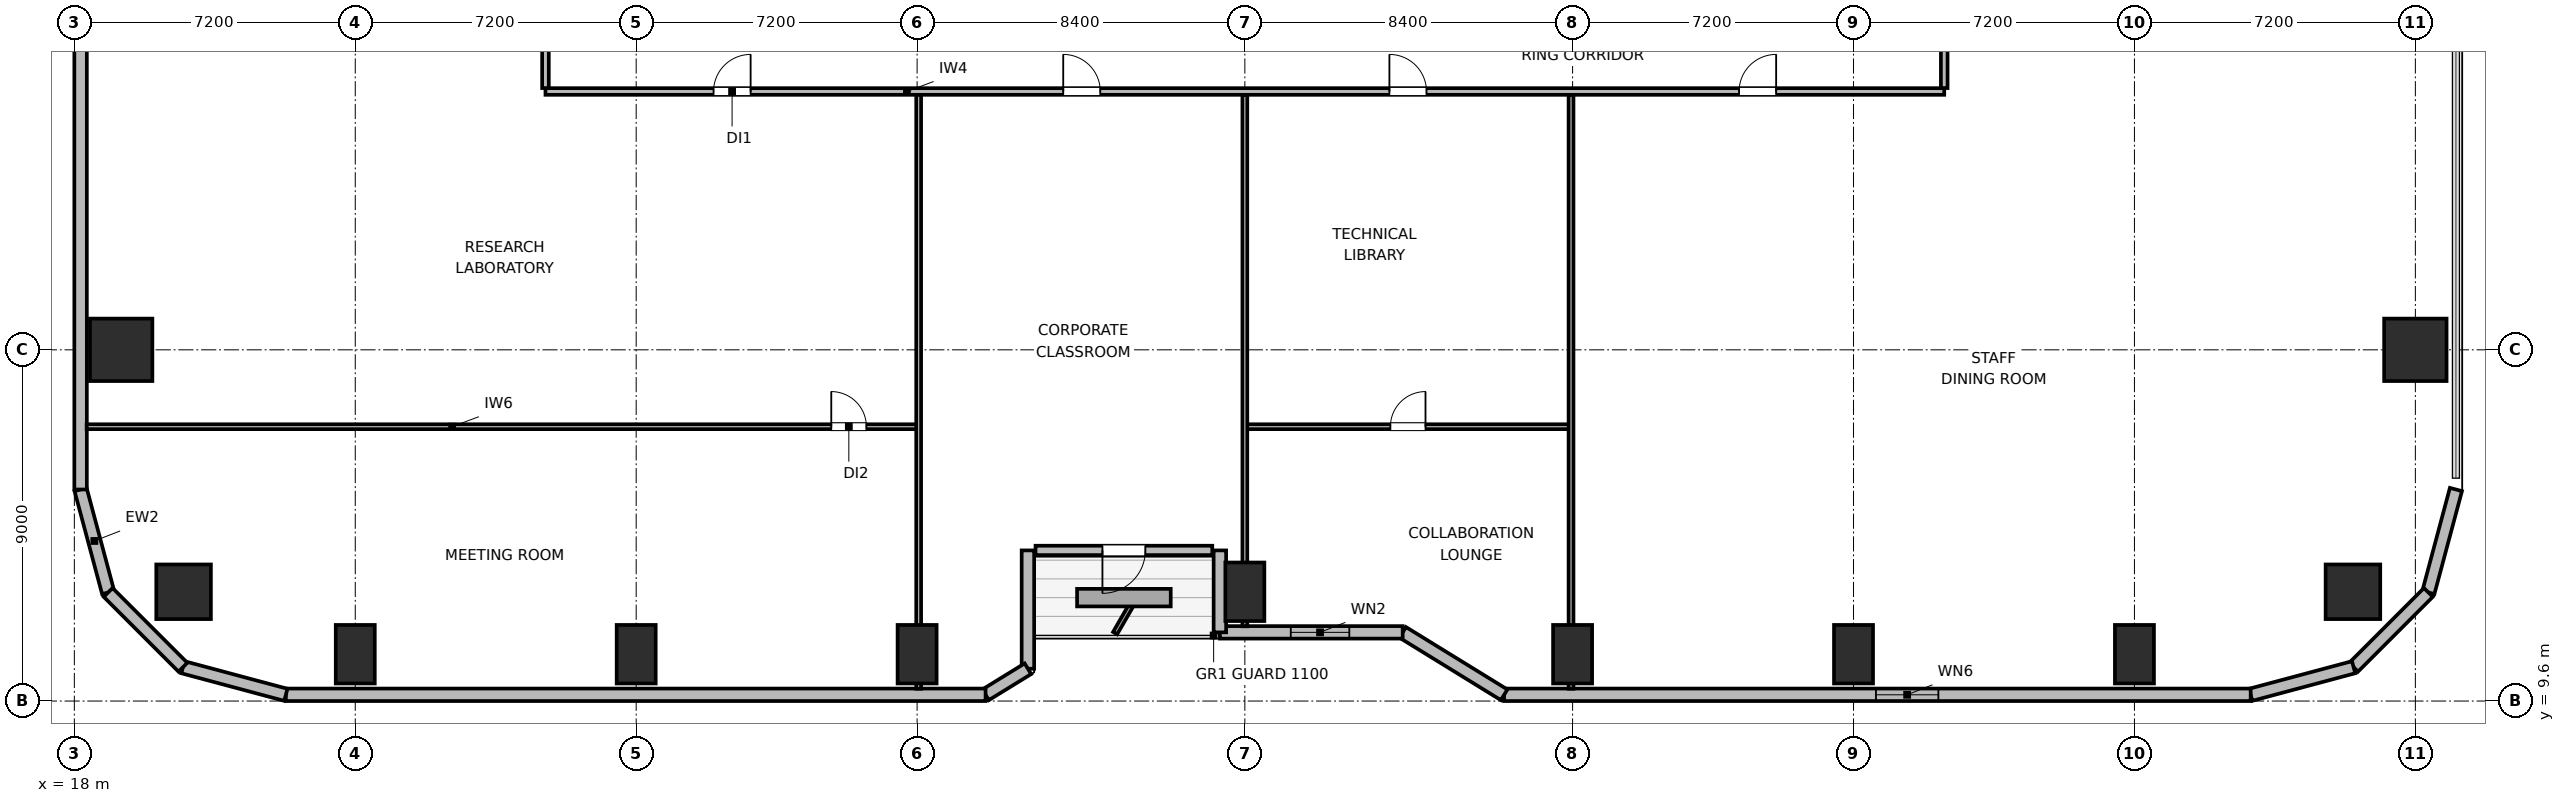
"""IFC4 building model, lengths in metres.
Left out: names, types, materials, properties, quantities, classifications, styles, units other than length and angle.
Written with IfcOpenShell. Run it as: python <this file> out.ifc"""

import sys

from ifc_helpers import new_model, si_unit, direction, frame, frame_2d, origin, origin_2d, place, context, subcontext, project, spatial, rectangle, circle, extrude, element, fill, save


model = new_model("IFC4")
c1 = context("Model", 3, precision=1e-05, world=origin(), true_north=direction((0.0, 1.0)))
c2 = subcontext(c1, "Body", "Model", "MODEL_VIEW")
j1 = project(units=[si_unit("LENGTHUNIT", "METRE"), si_unit("PLANEANGLEUNIT", "RADIAN")], contexts=[c1])
p1 = place(None, origin())
s1 = spatial("IfcSite", under=j1, at=p1, CompositionType="ELEMENT")
p2 = place(p1, origin())
s2 = spatial("IfcBuilding", under=s1, at=p2, CompositionType="ELEMENT")
p3 = place(p2, frame((0.0, 0.0, 41.1)))
s3 = spatial("IfcBuildingStorey", under=s2, at=p3, CompositionType="ELEMENT", Elevation=41.1)
for number, where, z_axis, x_axis in (
    (1, (20.8, 12.4, 0.0), (0.0, 0.0, 1.0), (1.0, 0.0, 0.0)),
    (2, (76.4, 12.4, 0.0), (0.0, 0.0, 1.0), (1.0, 0.0, 0.0)),
):
    element("IfcColumn", number, at=place(p3, frame(where, z_axis=z_axis, x_axis=x_axis)), inside=s3, PredefinedType="COLUMN", context=c2, shape_type="SweptSolid", body=[
        extrude(circle(Radius=0.7, at=origin_2d()), origin(), (0.0, 0.0, 1.0), 3.9),
    ])
for number, where, z_axis, x_axis in (
    (3, (25.2, 10.8, 0.0), (0.0, 0.0, 1.0), (1.0, 0.0, 0.0)),
    (4, (32.4, 10.8, 0.0), (0.0, 0.0, 1.0), (1.0, 0.0, 0.0)),
    (5, (39.6, 10.8, 0.0), (0.0, 0.0, 1.0), (1.0, 0.0, 0.0)),
    (6, (48.0, 12.4, 0.0), (0.0, 0.0, 1.0), (1.0, 0.0, 0.0)),
    (7, (56.4, 10.8, 0.0), (0.0, 0.0, 1.0), (1.0, 0.0, 0.0)),
    (8, (63.6, 10.8, 0.0), (0.0, 0.0, 1.0), (1.0, 0.0, 0.0)),
    (9, (70.8, 10.8, 0.0), (0.0, 0.0, 1.0), (1.0, 0.0, 0.0)),
):
    element("IfcColumn", number, at=place(p3, frame(where, z_axis=z_axis, x_axis=x_axis)), inside=s3, PredefinedType="COLUMN", context=c2, shape_type="SweptSolid", body=[
        extrude(rectangle(XDim=1.0, YDim=1.5, at=origin_2d()), origin(), (0.0, 0.0, 1.0), 3.9),
    ])
for number, where, z_axis, x_axis in (
    (10, (19.2, 18.6, 0.0), (0.0, 0.0, 1.0), (1.0, 0.0, 0.0)),
    (11, (78.0, 18.6, 0.0), (0.0, 0.0, 1.0), (1.0, 0.0, 0.0)),
):
    element("IfcColumn", number, at=place(p3, frame(where, z_axis=z_axis, x_axis=x_axis)), inside=s3, PredefinedType="COLUMN", context=c2, shape_type="SweptSolid", body=[
        extrude(rectangle(XDim=1.6, YDim=1.6, at=origin_2d()), origin(), (0.0, 0.0, 1.0), 3.9),
    ])
p4 = place(p3, frame((18.866, 12.383, 0.0), z_axis=(0.0, 0.0, 1.0), x_axis=(-0.25869736047, 0.965958423373, 0.0)))
e12 = element("IfcWall", 12, at=p4, inside=s3, PredefinedType="SOLIDWALL", context=c2, shape_type="SweptSolid", body=[
    extrude(rectangle(XDim=2.731, YDim=0.32, at=frame_2d((1.366, 0.0))), origin(), (0.0, 0.0, 1.0), 3.64),
])
p5 = place(p3, frame((18.16, 15.021, 0.0), z_axis=(0.0, 0.0, 1.0), x_axis=(0.0, 1.0, 0.0)))
e13 = element("IfcWall", 13, at=p5, inside=s3, PredefinedType="SOLIDWALL", context=c2, shape_type="SweptSolid", body=[
    extrude(rectangle(XDim=14.219, YDim=0.32, at=frame_2d((7.109, 0.0))), origin(), (0.0, 0.0, 1.0), 3.64),
])
p6 = place(p3, frame((79.04, 15.021, 0.0), z_axis=(0.0, 0.0, 1.0), x_axis=(-0.25869736047, -0.965958423373, 0.0)))
e14 = element("IfcWall", 14, at=p6, inside=s3, PredefinedType="SOLIDWALL", context=c2, shape_type="SweptSolid", body=[
    extrude(rectangle(XDim=2.731, YDim=0.32, at=frame_2d((1.366, 0.0))), origin(), (0.0, 0.0, 1.0), 3.64),
])
p7 = place(p3, frame((78.333, 12.383, 0.0), z_axis=(0.0, 0.0, 1.0), x_axis=(-0.707106781187, -0.707106781187, 0.0)))
e15 = element("IfcWall", 15, at=p7, inside=s3, PredefinedType="SOLIDWALL", context=c2, shape_type="SweptSolid", body=[
    extrude(rectangle(XDim=2.71, YDim=0.32, at=frame_2d((1.355, 0.0))), origin(), (0.0, 0.0, 1.0), 3.64),
])
p8 = place(p3, frame((76.417, 10.467, 0.0), z_axis=(0.0, 0.0, 1.0), x_axis=(-0.965964405026, -0.25867502435, 0.0)))
e16 = element("IfcWall", 16, at=p8, inside=s3, PredefinedType="SOLIDWALL", context=c2, shape_type="SweptSolid", body=[
    extrude(rectangle(XDim=2.731, YDim=0.32, at=frame_2d((1.366, 0.0))), origin(), (0.0, 0.0, 1.0), 3.64),
])
p9 = place(p3, frame((73.779, 9.76, 0.0), z_axis=(0.0, 0.0, 1.0), x_axis=(-1.0, 0.0, 0.0)))
e17 = element("IfcWall", 17, at=p9, inside=s3, PredefinedType="SOLIDWALL", context=c2, shape_type="SweptSolid", body=[
    extrude(rectangle(XDim=19.134, YDim=0.32, at=frame_2d((9.567, 0.0))), origin(), (0.0, 0.0, 1.0), 3.64),
])
p10 = place(p9, frame((8.004, 0.0, 0.85)))
e18 = element("IfcOpeningElement", 18, at=p10, cuts=e17, PredefinedType="OPENING", context=c2, shape_type="SweptSolid", body=[
    extrude(rectangle(XDim=1.6, YDim=1.0, at=frame_2d((0.8, 0.5))), frame((0.0, 0.17, 0.0), z_axis=(0.0, -1.0, 0.0), x_axis=(1.0, 0.0, 0.0)), (0.0, 0.0, 1.0), 0.34),
])
p11 = place(p3, frame((54.645, 9.76, 0.0), z_axis=(0.0, 0.0, 1.0), x_axis=(-0.851630857047, 0.524142044989, 0.0)))
e19 = element("IfcWall", 19, at=p11, inside=s3, PredefinedType="SOLIDWALL", context=c2, shape_type="SweptSolid", body=[
    extrude(rectangle(XDim=3.053, YDim=0.32, at=frame_2d((1.526, 0.0))), origin(), (0.0, 0.0, 1.0), 2.875),
])
p12 = place(p3, frame((52.045, 11.36, 0.0), z_axis=(0.0, 0.0, 1.0), x_axis=(-1.0, 0.0, 0.0)))
e20 = element("IfcWall", 20, at=p12, inside=s3, PredefinedType="SOLIDWALL", context=c2, shape_type="SweptSolid", body=[
    extrude(rectangle(XDim=4.685, YDim=0.32, at=frame_2d((2.343, 0.0))), origin(), (0.0, 0.0, 1.0), 2.875),
])
p13 = place(p12, frame((1.368, 0.0, 0.85)))
e21 = element("IfcOpeningElement", 21, at=p13, cuts=e20, PredefinedType="OPENING", context=c2, shape_type="SweptSolid", body=[
    extrude(rectangle(XDim=1.5, YDim=1.1, at=frame_2d((0.75, 0.55))), frame((0.0, 0.17, 0.0), z_axis=(0.0, -1.0, 0.0), x_axis=(1.0, 0.0, 0.0)), (0.0, 0.0, 1.0), 0.34),
])
p14 = place(p3, frame((47.36, 11.36, 0.0), z_axis=(0.0, 0.0, 1.0), x_axis=(0.0, 1.0, 0.0)))
e22 = element("IfcWall", 22, at=p14, inside=s3, PredefinedType="SOLIDWALL", context=c2, shape_type="SweptSolid", body=[
    extrude(rectangle(XDim=2.1, YDim=0.32, at=frame_2d((1.05, 0.0))), origin(), (0.0, 0.0, 1.0), 2.875),
])
p15 = place(p3, frame((47.165, 13.46, 0.0), z_axis=(0.0, 0.0, 1.0), x_axis=(-1.0, 0.0, 0.0)))
e23 = element("IfcWall", 23, at=p15, inside=s3, PredefinedType="SOLIDWALL", context=c2, shape_type="SweptSolid", body=[
    extrude(rectangle(XDim=4.53, YDim=0.24, at=frame_2d((2.265, 0.0))), origin(), (0.0, 0.0, 1.0), 3.64),
])
p16 = place(p15, frame((1.715, 0.0, 0.0)))
e24 = element("IfcOpeningElement", 24, at=p16, cuts=e23, PredefinedType="OPENING", context=c2, shape_type="SweptSolid", body=[
    extrude(rectangle(XDim=1.1, YDim=2.04, at=frame_2d((0.55, 1.02))), frame((0.0, 0.13, 0.0), z_axis=(0.0, -1.0, 0.0), x_axis=(1.0, 0.0, 0.0)), (0.0, 0.0, 1.0), 0.26),
])
p17 = place(p3, frame((42.44, 13.46, 0.0), z_axis=(0.0, 0.0, 1.0), x_axis=(0.0, -1.0, 0.0)))
e25 = element("IfcWall", 25, at=p17, inside=s3, PredefinedType="SOLIDWALL", context=c2, shape_type="SweptSolid", body=[
    extrude(rectangle(XDim=3.032, YDim=0.32, at=frame_2d((1.516, 0.0))), origin(), (0.0, 0.0, 1.0), 2.875),
])
p18 = place(p3, frame((42.44, 10.427, 0.0), z_axis=(0.0, 0.0, 1.0), x_axis=(-0.851776724646, -0.523904964045, 0.0)))
e26 = element("IfcWall", 26, at=p18, inside=s3, PredefinedType="SOLIDWALL", context=c2, shape_type="SweptSolid", body=[
    extrude(rectangle(XDim=1.274, YDim=0.32, at=frame_2d((0.637, 0.0))), origin(), (0.0, 0.0, 1.0), 3.64),
])
p19 = place(p3, frame((41.355, 9.76, 0.0), z_axis=(0.0, 0.0, 1.0), x_axis=(-1.0, 0.0, 0.0)))
e27 = element("IfcWall", 27, at=p19, inside=s3, PredefinedType="SOLIDWALL", context=c2, shape_type="SweptSolid", body=[
    extrude(rectangle(XDim=17.934, YDim=0.32, at=frame_2d((8.967, 0.0))), origin(), (0.0, 0.0, 1.0), 3.64),
])
p20 = place(p3, frame((23.421, 9.76, 0.0), z_axis=(0.0, 0.0, 1.0), x_axis=(-0.965964405026, 0.25867502435, 0.0)))
e28 = element("IfcWall", 28, at=p20, inside=s3, PredefinedType="SOLIDWALL", context=c2, shape_type="SweptSolid", body=[
    extrude(rectangle(XDim=2.731, YDim=0.32, at=frame_2d((1.366, 0.0))), origin(), (0.0, 0.0, 1.0), 3.64),
])
p21 = place(p3, frame((20.783, 10.467, 0.0), z_axis=(0.0, 0.0, 1.0), x_axis=(-0.707106781187, 0.707106781187, 0.0)))
e29 = element("IfcWall", 29, at=p21, inside=s3, PredefinedType="SOLIDWALL", context=c2, shape_type="SweptSolid", body=[
    extrude(rectangle(XDim=2.71, YDim=0.32, at=frame_2d((1.355, 0.0))), origin(), (0.0, 0.0, 1.0), 3.64),
])
p22 = place(p3, frame((30.075, 25.22, 0.0), z_axis=(0.0, 0.0, 1.0), x_axis=(1.0, 0.0, 0.0)))
e30 = element("IfcWall", 30, at=p22, inside=s3, PredefinedType="PARTITIONING", context=c2, shape_type="SweptSolid", body=[
    extrude(rectangle(XDim=35.85, YDim=0.17, at=frame_2d((17.925, 0.0))), origin(), (0.0, 0.0, 1.0), 3.64),
])
p23 = place(p22, frame((4.308, 0.0, 0.0)))
e31 = element("IfcOpeningElement", 31, at=p23, cuts=e30, PredefinedType="OPENING", context=c2, shape_type="SweptSolid", body=[
    extrude(rectangle(XDim=0.95, YDim=2.04, at=frame_2d((0.475, 1.02))), frame((0.0, 0.095, 0.0), z_axis=(0.0, -1.0, 0.0), x_axis=(1.0, 0.0, 0.0)), (0.0, 0.0, 1.0), 0.19),
])
p24 = place(p22, frame((13.27, 0.0, 0.0)))
e32 = element("IfcOpeningElement", 32, at=p24, cuts=e30, PredefinedType="OPENING", context=c2, shape_type="SweptSolid", body=[
    extrude(rectangle(XDim=0.95, YDim=2.04, at=frame_2d((0.475, 1.02))), frame((0.0, 0.095, 0.0), z_axis=(0.0, -1.0, 0.0), x_axis=(1.0, 0.0, 0.0)), (0.0, 0.0, 1.0), 0.19),
])
p25 = place(p22, frame((21.63, 0.0, 0.0)))
e33 = element("IfcOpeningElement", 33, at=p25, cuts=e30, PredefinedType="OPENING", context=c2, shape_type="SweptSolid", body=[
    extrude(rectangle(XDim=0.95, YDim=2.04, at=frame_2d((0.475, 1.02))), frame((0.0, 0.095, 0.0), z_axis=(0.0, -1.0, 0.0), x_axis=(1.0, 0.0, 0.0)), (0.0, 0.0, 1.0), 0.19),
])
p26 = place(p22, frame((30.592, 0.0, 0.0)))
e34 = element("IfcOpeningElement", 34, at=p26, cuts=e30, PredefinedType="OPENING", context=c2, shape_type="SweptSolid", body=[
    extrude(rectangle(XDim=0.95, YDim=2.04, at=frame_2d((0.475, 1.02))), frame((0.0, 0.095, 0.0), z_axis=(0.0, -1.0, 0.0), x_axis=(1.0, 0.0, 0.0)), (0.0, 0.0, 1.0), 0.19),
])
p27 = place(p3, frame((30.075, 25.307, 0.0), z_axis=(0.0, 0.0, 1.0), x_axis=(0.0, 1.0, 0.0)))
e35 = element("IfcWall", 35, at=p27, inside=s3, PredefinedType="PARTITIONING", context=c2, shape_type="SweptSolid", body=[
    extrude(rectangle(XDim=21.386, YDim=0.17, at=frame_2d((10.693, 0.0))), origin(), (0.0, 0.0, 1.0), 3.64),
])
p28 = place(p27, frame((3.528, 0.0, 0.0)))
e36 = element("IfcOpeningElement", 36, at=p28, cuts=e35, PredefinedType="OPENING", context=c2, shape_type="SweptSolid", body=[
    extrude(rectangle(XDim=0.95, YDim=2.04, at=frame_2d((0.475, 1.02))), frame((0.0, 0.095, 0.0), z_axis=(0.0, -1.0, 0.0), x_axis=(1.0, 0.0, 0.0)), (0.0, 0.0, 1.0), 0.19),
])
p29 = place(p27, frame((10.818, 0.0, 0.0)))
e37 = element("IfcOpeningElement", 37, at=p29, cuts=e35, PredefinedType="OPENING", context=c2, shape_type="SweptSolid", body=[
    extrude(rectangle(XDim=0.95, YDim=2.04, at=frame_2d((0.475, 1.02))), frame((0.0, 0.095, 0.0), z_axis=(0.0, -1.0, 0.0), x_axis=(1.0, 0.0, 0.0)), (0.0, 0.0, 1.0), 0.19),
])
p30 = place(p27, frame((17.508, 0.0, 0.0)))
e38 = element("IfcOpeningElement", 38, at=p30, cuts=e35, PredefinedType="OPENING", context=c2, shape_type="SweptSolid", body=[
    extrude(rectangle(XDim=0.95, YDim=2.04, at=frame_2d((0.475, 1.02))), frame((0.0, 0.095, 0.0), z_axis=(0.0, -1.0, 0.0), x_axis=(1.0, 0.0, 0.0)), (0.0, 0.0, 1.0), 0.19),
])
p31 = place(p3, frame((65.925, 25.307, 0.0), z_axis=(0.0, 0.0, 1.0), x_axis=(0.0, 1.0, 0.0)))
e39 = element("IfcWall", 39, at=p31, inside=s3, PredefinedType="PARTITIONING", context=c2, shape_type="SweptSolid", body=[
    extrude(rectangle(XDim=21.386, YDim=0.17, at=frame_2d((10.693, 0.0))), origin(), (0.0, 0.0, 1.0), 3.64),
])
p32 = place(p31, frame((5.428, 0.0, 0.0)))
e40 = element("IfcOpeningElement", 40, at=p32, cuts=e39, PredefinedType="OPENING", context=c2, shape_type="SweptSolid", body=[
    extrude(rectangle(XDim=0.95, YDim=2.04, at=frame_2d((0.475, 1.02))), frame((0.0, 0.095, 0.0), z_axis=(0.0, -1.0, 0.0), x_axis=(1.0, 0.0, 0.0)), (0.0, 0.0, 1.0), 0.19),
])
p33 = place(p31, frame((16.208, 0.0, 0.0)))
e41 = element("IfcOpeningElement", 41, at=p33, cuts=e39, PredefinedType="OPENING", context=c2, shape_type="SweptSolid", body=[
    extrude(rectangle(XDim=0.95, YDim=2.04, at=frame_2d((0.475, 1.02))), frame((0.0, 0.095, 0.0), z_axis=(0.0, -1.0, 0.0), x_axis=(1.0, 0.0, 0.0)), (0.0, 0.0, 1.0), 0.19),
])
p34 = place(p3, frame((18.315, 16.63, 0.0), z_axis=(0.0, 0.0, 1.0), x_axis=(1.0, 0.0, 0.0)))
e42 = element("IfcWall", 42, at=p34, inside=s3, PredefinedType="PARTITIONING", context=c2, shape_type="SweptSolid", body=[
    extrude(rectangle(XDim=21.325, YDim=0.125, at=frame_2d((10.663, 0.0))), origin(), (0.0, 0.0, 1.0), 3.64),
])
p35 = place(p34, frame((19.085, 0.0, 0.0)))
e43 = element("IfcOpeningElement", 43, at=p35, cuts=e42, PredefinedType="OPENING", context=c2, shape_type="SweptSolid", body=[
    extrude(rectangle(XDim=0.9, YDim=2.02, at=frame_2d((0.45, 1.01))), frame((0.0, 0.073, 0.0), z_axis=(0.0, -1.0, 0.0), x_axis=(1.0, 0.0, 0.0)), (0.0, 0.0, 1.0), 0.145),
])
p36 = place(p3, frame((39.64, 9.915, 0.0), z_axis=(0.0, 0.0, 1.0), x_axis=(0.0, 1.0, 0.0)))
e44 = element("IfcWall", 44, at=p36, inside=s3, PredefinedType="PARTITIONING", context=c2, shape_type="SweptSolid", body=[
    extrude(rectangle(XDim=15.218, YDim=0.125, at=frame_2d((7.609, 0.0))), origin(), (0.0, 0.0, 1.0), 2.93),
])
p37 = place(p3, frame((48.0, 16.63, 0.0), z_axis=(0.0, 0.0, 1.0), x_axis=(1.0, 0.0, 0.0)))
e45 = element("IfcWall", 45, at=p37, inside=s3, PredefinedType="PARTITIONING", context=c2, shape_type="SweptSolid", body=[
    extrude(rectangle(XDim=8.36, YDim=0.125, at=frame_2d((4.18, 0.0))), origin(), (0.0, 0.0, 1.0), 3.64),
])
p38 = place(p37, frame((3.73, 0.0, 0.0)))
e46 = element("IfcOpeningElement", 46, at=p38, cuts=e45, PredefinedType="OPENING", context=c2, shape_type="SweptSolid", body=[
    extrude(rectangle(XDim=0.9, YDim=2.02, at=frame_2d((0.45, 1.01))), frame((0.0, 0.073, 0.0), z_axis=(0.0, -1.0, 0.0), x_axis=(1.0, 0.0, 0.0)), (0.0, 0.0, 1.0), 0.145),
])
p39 = place(p3, frame((48.0, 11.515, 0.0), z_axis=(0.0, 0.0, 1.0), x_axis=(0.0, 1.0, 0.0)))
e47 = element("IfcWall", 47, at=p39, inside=s3, PredefinedType="PARTITIONING", context=c2, shape_type="SweptSolid", body=[
    extrude(rectangle(XDim=13.618, YDim=0.125, at=frame_2d((6.809, 0.0))), origin(), (0.0, 0.0, 1.0), 2.93),
])
p40 = place(p3, frame((56.36, 9.915, 0.0), z_axis=(0.0, 0.0, 1.0), x_axis=(0.0, 1.0, 0.0)))
e48 = element("IfcWall", 48, at=p40, inside=s3, PredefinedType="PARTITIONING", context=c2, shape_type="SweptSolid", body=[
    extrude(rectangle(XDim=15.218, YDim=0.125, at=frame_2d((7.609, 0.0))), origin(), (0.0, 0.0, 1.0), 2.93),
])
p41 = place(p10, origin())
e49 = element("IfcWindow", 49, at=p41, inside=s3, PartitioningType="SINGLE_PANEL", PredefinedType="WINDOW", context=c2, shape_type="SweptSolid", body=[
    extrude(rectangle(XDim=1.6, YDim=1.0, at=frame_2d((0.8, 0.5))), frame((0.0, 0.03, 0.0), z_axis=(0.0, -1.0, 0.0), x_axis=(1.0, 0.0, 0.0)), (0.0, 0.0, 1.0), 0.06),
])
fill(e18, e49)
p42 = place(p13, origin())
e50 = element("IfcWindow", 50, at=p42, inside=s3, PartitioningType="SINGLE_PANEL", PredefinedType="WINDOW", context=c2, shape_type="SweptSolid", body=[
    extrude(rectangle(XDim=1.5, YDim=1.1, at=frame_2d((0.75, 0.55))), frame((0.0, 0.03, 0.0), z_axis=(0.0, -1.0, 0.0), x_axis=(1.0, 0.0, 0.0)), (0.0, 0.0, 1.0), 0.06),
])
fill(e21, e50)
p43 = place(p16, origin())
e51 = element("IfcDoor", 51, at=p43, inside=s3, OperationType="SINGLE_SWING_RIGHT", PredefinedType="DOOR", context=c2, shape_type="SweptSolid", body=[
    extrude(rectangle(XDim=1.1, YDim=2.04, at=frame_2d((0.55, 1.02))), frame((0.0, 0.025, 0.0), z_axis=(0.0, -1.0, 0.0), x_axis=(1.0, 0.0, 0.0)), (0.0, 0.0, 1.0), 0.05),
])
fill(e24, e51)
p44 = place(p35, origin())
e52 = element("IfcDoor", 52, at=p44, inside=s3, OperationType="SINGLE_SWING_LEFT", PredefinedType="DOOR", context=c2, shape_type="SweptSolid", body=[
    extrude(rectangle(XDim=0.9, YDim=2.02, at=frame_2d((0.45, 1.01))), frame((0.0, 0.025, 0.0), z_axis=(0.0, -1.0, 0.0), x_axis=(1.0, 0.0, 0.0)), (0.0, 0.0, 1.0), 0.05),
])
fill(e43, e52)
p45 = place(p23, origin())
e53 = element("IfcDoor", 53, at=p45, inside=s3, OperationType="SINGLE_SWING_RIGHT", PredefinedType="DOOR", context=c2, shape_type="SweptSolid", body=[
    extrude(rectangle(XDim=0.95, YDim=2.04, at=frame_2d((0.475, 1.02))), frame((0.0, 0.025, 0.0), z_axis=(0.0, -1.0, 0.0), x_axis=(1.0, 0.0, 0.0)), (0.0, 0.0, 1.0), 0.05),
])
fill(e31, e53)
p46 = place(p24, origin())
e54 = element("IfcDoor", 54, at=p46, inside=s3, OperationType="SINGLE_SWING_LEFT", PredefinedType="DOOR", context=c2, shape_type="SweptSolid", body=[
    extrude(rectangle(XDim=0.95, YDim=2.04, at=frame_2d((0.475, 1.02))), frame((0.0, 0.025, 0.0), z_axis=(0.0, -1.0, 0.0), x_axis=(1.0, 0.0, 0.0)), (0.0, 0.0, 1.0), 0.05),
])
fill(e32, e54)
p47 = place(p38, origin())
e55 = element("IfcDoor", 55, at=p47, inside=s3, OperationType="SINGLE_SWING_RIGHT", PredefinedType="DOOR", context=c2, shape_type="SweptSolid", body=[
    extrude(rectangle(XDim=0.9, YDim=2.02, at=frame_2d((0.45, 1.01))), frame((0.0, 0.025, 0.0), z_axis=(0.0, -1.0, 0.0), x_axis=(1.0, 0.0, 0.0)), (0.0, 0.0, 1.0), 0.05),
])
fill(e46, e55)
p48 = place(p25, origin())
e56 = element("IfcDoor", 56, at=p48, inside=s3, OperationType="SINGLE_SWING_LEFT", PredefinedType="DOOR", context=c2, shape_type="SweptSolid", body=[
    extrude(rectangle(XDim=0.95, YDim=2.04, at=frame_2d((0.475, 1.02))), frame((0.0, 0.025, 0.0), z_axis=(0.0, -1.0, 0.0), x_axis=(1.0, 0.0, 0.0)), (0.0, 0.0, 1.0), 0.05),
])
fill(e33, e56)
p49 = place(p26, origin())
e57 = element("IfcDoor", 57, at=p49, inside=s3, OperationType="SINGLE_SWING_RIGHT", PredefinedType="DOOR", context=c2, shape_type="SweptSolid", body=[
    extrude(rectangle(XDim=0.95, YDim=2.04, at=frame_2d((0.475, 1.02))), frame((0.0, 0.025, 0.0), z_axis=(0.0, -1.0, 0.0), x_axis=(1.0, 0.0, 0.0)), (0.0, 0.0, 1.0), 0.05),
])
fill(e34, e57)
save(model, sys.argv[1])
